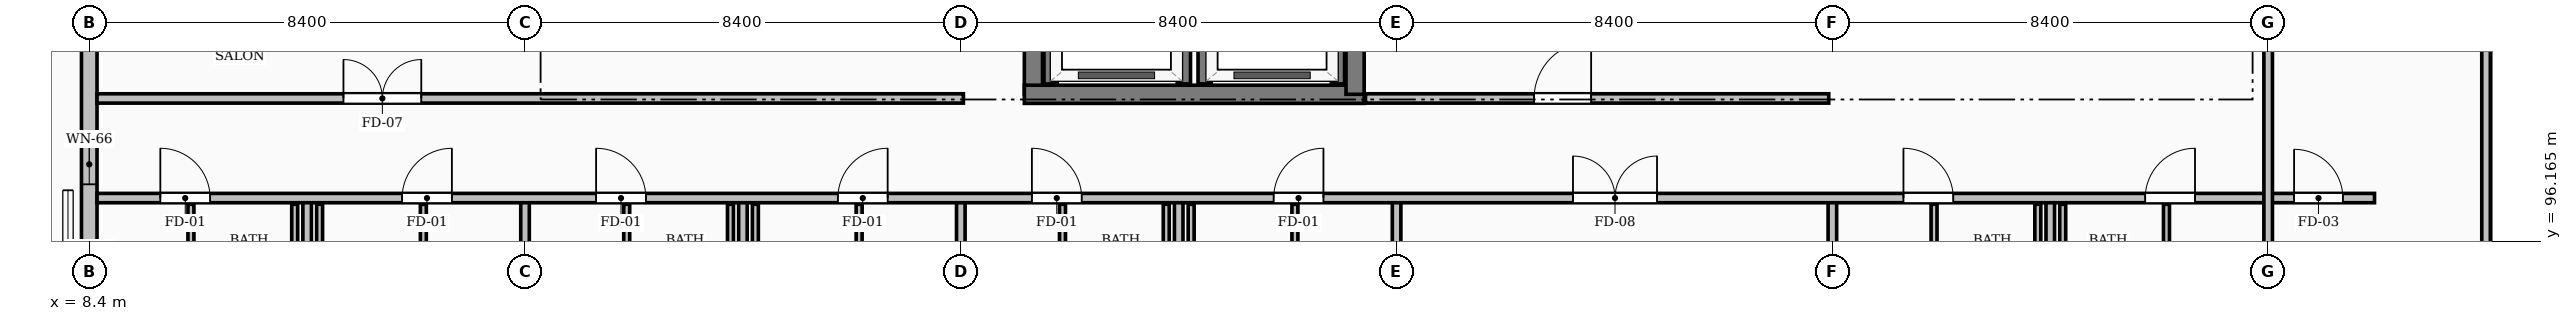
"""IFC4 building model, lengths in metres.
Left out: names, types, materials, properties, quantities, classifications, styles, units other than length and angle.
Written with IfcOpenShell. Run it as: python <this file> out.ifc"""

import sys

from ifc_helpers import new_model, si_unit, direction, frame, frame_2d, origin, place, context, subcontext, project, spatial, rectangle, extrude, element, fill, save


model = new_model("IFC4")
c1 = context("Model", 3, precision=1e-05, world=origin(), true_north=direction((0.0, 1.0)))
c2 = subcontext(c1, "Body", "Model", "MODEL_VIEW")
j1 = project(units=[si_unit("LENGTHUNIT", "METRE"), si_unit("PLANEANGLEUNIT", "RADIAN")], contexts=[c1])
p1 = place(None, origin())
s1 = spatial("IfcSite", under=j1, at=p1, CompositionType="ELEMENT")
p2 = place(p1, origin())
s2 = spatial("IfcBuilding", under=s1, at=p2, CompositionType="ELEMENT")
p3 = place(p2, frame((0.0, 0.0, 28.56)))
s3 = spatial("IfcBuildingStorey", under=s2, at=p3, CompositionType="ELEMENT", Elevation=28.56)
p4 = place(p3, frame((26.6, 99.0, 0.0), z_axis=(0.0, 0.0, 1.0), x_axis=(0.0, 1.0, 0.0)))
e1 = element("IfcWall", 1, at=p4, inside=s3, PredefinedType="SHEAR", context=c2, shape_type="SweptSolid", body=[
    extrude(rectangle(XDim=6.15, YDim=0.35, at=frame_2d((3.075, 0.0))), origin(), (0.0, 0.0, 1.0), 3.12),
])
p5 = place(p3, frame((26.425, 99.0, 0.0), z_axis=(0.0, 0.0, 1.0), x_axis=(1.0, 0.0, 0.0)))
e2 = element("IfcWall", 2, at=p5, inside=s3, PredefinedType="SHEAR", context=c2, shape_type="SweptSolid", body=[
    extrude(rectangle(XDim=6.55, YDim=0.35, at=frame_2d((3.275, 0.0))), origin(), (0.0, 0.0, 1.0), 3.12),
])
p6 = place(p3, frame((32.8, 99.0, 0.0), z_axis=(0.0, 0.0, 1.0), x_axis=(0.0, 1.0, 0.0)))
e3 = element("IfcWall", 3, at=p6, inside=s3, PredefinedType="SHEAR", context=c2, shape_type="SweptSolid", body=[
    extrude(rectangle(XDim=6.15, YDim=0.35, at=frame_2d((3.075, 0.0))), origin(), (0.0, 0.0, 1.0), 3.12),
])
p7 = place(p3, frame((8.4, 92.701, 0.0), z_axis=(0.0, 0.0, 1.0), x_axis=(0.0, 1.0, 0.0)))
e4 = element("IfcWall", 4, at=p7, inside=s3, PredefinedType="SOLIDWALL", context=c2, shape_type="SweptSolid", body=[
    extrude(rectangle(XDim=7.798, YDim=0.3, at=frame_2d((3.899, 0.0))), origin(), (0.0, 0.0, 1.0), 2.494),
])
p8 = place(p7, frame((2.464, 0.0, 0.3)))
e5 = element("IfcOpeningElement", 5, at=p8, cuts=e4, PredefinedType="OPENING", context=c2, shape_type="SweptSolid", body=[
    extrude(rectangle(XDim=0.77, YDim=1.9, at=frame_2d((0.385, 0.95))), frame((0.0, 0.16, 0.0), z_axis=(0.0, -1.0, 0.0), x_axis=(1.0, 0.0, 0.0)), (0.0, 0.0, 1.0), 0.32),
])
p9 = place(p7, frame((4.564, 0.0, 0.3)))
e6 = element("IfcOpeningElement", 6, at=p9, cuts=e4, PredefinedType="OPENING", context=c2, shape_type="SweptSolid", body=[
    extrude(rectangle(XDim=0.77, YDim=1.9, at=frame_2d((0.385, 0.95))), frame((0.0, 0.16, 0.0), z_axis=(0.0, -1.0, 0.0), x_axis=(1.0, 0.0, 0.0)), (0.0, 0.0, 1.0), 0.32),
])
for number, where, z_axis, x_axis in (
    (7, (26.93, 99.2, 0.0), (0.0, 0.0, 1.0), (0.0, 1.0, 0.0)),
    (8, (29.5, 99.2, 0.0), (0.0, 0.0, 1.0), (0.0, 1.0, 0.0)),
    (9, (29.9, 99.2, 0.0), (0.0, 0.0, 1.0), (0.0, 1.0, 0.0)),
    (10, (32.47, 99.2, 0.0), (0.0, 0.0, 1.0), (0.0, 1.0, 0.0)),
):
    element("IfcWall", number, at=place(p3, frame(where, z_axis=z_axis, x_axis=x_axis)), inside=s3, PredefinedType="SOLIDWALL", context=c2, shape_type="SweptSolid", body=[
        extrude(rectangle(XDim=2.2, YDim=0.255, at=frame_2d((1.1, 0.0))), origin(), (0.0, 0.0, 1.0), 3.12),
    ])
for number, where, z_axis, x_axis in (
    (11, (10.36, 94.73, 0.0), (0.0, 0.0, 1.0), (0.0, 1.0, 0.0)),
    (12, (12.36, 94.73, 0.0), (0.0, 0.0, 1.0), (0.0, 1.0, 0.0)),
    (13, (12.84, 94.73, 0.0), (0.0, 0.0, 1.0), (0.0, 1.0, 0.0)),
    (14, (14.84, 94.73, 0.0), (0.0, 0.0, 1.0), (0.0, 1.0, 0.0)),
):
    element("IfcWall", number, at=place(p3, frame(where, z_axis=z_axis, x_axis=x_axis)), inside=s3, PredefinedType="PARTITIONING", context=c2, shape_type="SweptSolid", body=[
        extrude(rectangle(XDim=2.15, YDim=0.115, at=frame_2d((1.075, 0.0))), origin(), (0.0, 0.0, 1.0), 3.12),
    ])
p10 = place(p3, frame((12.6, 92.55, 0.0), z_axis=(0.0, 0.0, 1.0), x_axis=(0.0, 1.0, 0.0)))
e15 = element("IfcWall", 15, at=p10, inside=s3, PredefinedType="PARTITIONING", context=c2, shape_type="SweptSolid", body=[
    extrude(rectangle(XDim=4.45, YDim=0.165, at=frame_2d((2.225, 0.0))), origin(), (0.0, 0.0, 1.0), 3.12),
])
p11 = place(p3, frame((18.76, 94.73, 0.0), z_axis=(0.0, 0.0, 1.0), x_axis=(0.0, 1.0, 0.0)))
e16 = element("IfcWall", 16, at=p11, inside=s3, PredefinedType="PARTITIONING", context=c2, shape_type="SweptSolid", body=[
    extrude(rectangle(XDim=2.15, YDim=0.115, at=frame_2d((1.075, 0.0))), origin(), (0.0, 0.0, 1.0), 2.642),
])
for number, where, z_axis, x_axis in (
    (17, (20.76, 94.73, 0.0), (0.0, 0.0, 1.0), (0.0, 1.0, 0.0)),
    (18, (21.24, 94.73, 0.0), (0.0, 0.0, 1.0), (0.0, 1.0, 0.0)),
):
    element("IfcWall", number, at=place(p3, frame(where, z_axis=z_axis, x_axis=x_axis)), inside=s3, PredefinedType="PARTITIONING", context=c2, shape_type="SweptSolid", body=[
        extrude(rectangle(XDim=2.15, YDim=0.115, at=frame_2d((1.075, 0.0))), origin(), (0.0, 0.0, 1.0), 3.12),
    ])
p12 = place(p3, frame((23.24, 94.73, 0.0), z_axis=(0.0, 0.0, 1.0), x_axis=(0.0, 1.0, 0.0)))
e19 = element("IfcWall", 19, at=p12, inside=s3, PredefinedType="PARTITIONING", context=c2, shape_type="SweptSolid", body=[
    extrude(rectangle(XDim=2.15, YDim=0.115, at=frame_2d((1.075, 0.0))), origin(), (0.0, 0.0, 1.0), 2.642),
])
p13 = place(p3, frame((21.0, 92.562, 0.0), z_axis=(0.0, 0.0, 1.0), x_axis=(0.0, 1.0, 0.0)))
e20 = element("IfcWall", 20, at=p13, inside=s3, PredefinedType="PARTITIONING", context=c2, shape_type="SweptSolid", body=[
    extrude(rectangle(XDim=4.438, YDim=0.165, at=frame_2d((2.219, 0.0))), origin(), (0.0, 0.0, 1.0), 3.12),
])
p14 = place(p3, frame((16.8, 92.75, 0.0), z_axis=(0.0, 0.0, 1.0), x_axis=(0.0, 1.0, 0.0)))
e21 = element("IfcWall", 21, at=p14, inside=s3, PredefinedType="PARTITIONING", context=c2, shape_type="SweptSolid", body=[
    extrude(rectangle(XDim=4.25, YDim=0.165, at=frame_2d((2.125, 0.0))), origin(), (0.0, 0.0, 1.0), 2.455),
])
for number, where, z_axis, x_axis in (
    (22, (27.16, 94.73, 0.0), (0.0, 0.0, 1.0), (0.0, 1.0, 0.0)),
    (23, (29.16, 94.73, 0.0), (0.0, 0.0, 1.0), (0.0, 1.0, 0.0)),
    (24, (29.64, 94.73, 0.0), (0.0, 0.0, 1.0), (0.0, 1.0, 0.0)),
    (25, (31.64, 94.73, 0.0), (0.0, 0.0, 1.0), (0.0, 1.0, 0.0)),
):
    element("IfcWall", number, at=place(p3, frame(where, z_axis=z_axis, x_axis=x_axis)), inside=s3, PredefinedType="PARTITIONING", context=c2, shape_type="SweptSolid", body=[
        extrude(rectangle(XDim=2.15, YDim=0.115, at=frame_2d((1.075, 0.0))), origin(), (0.0, 0.0, 1.0), 3.12),
    ])
p15 = place(p3, frame((29.4, 92.575, 0.0), z_axis=(0.0, 0.0, 1.0), x_axis=(0.0, 1.0, 0.0)))
e26 = element("IfcWall", 26, at=p15, inside=s3, PredefinedType="PARTITIONING", context=c2, shape_type="SweptSolid", body=[
    extrude(rectangle(XDim=4.425, YDim=0.165, at=frame_2d((2.212, 0.0))), origin(), (0.0, 0.0, 1.0), 3.12),
])
for number, where, z_axis, x_axis in (
    (27, (25.2, 92.75, 0.0), (0.0, 0.0, 1.0), (0.0, 1.0, 0.0)),
    (28, (33.6, 92.75, 0.0), (0.0, 0.0, 1.0), (0.0, 1.0, 0.0)),
):
    element("IfcWall", number, at=place(p3, frame(where, z_axis=z_axis, x_axis=x_axis)), inside=s3, PredefinedType="PARTITIONING", context=c2, shape_type="SweptSolid", body=[
        extrude(rectangle(XDim=4.25, YDim=0.165, at=frame_2d((2.125, 0.0))), origin(), (0.0, 0.0, 1.0), 2.455),
    ])
for number, where, z_axis, x_axis in (
    (29, (43.96, 94.73, 0.0), (0.0, 0.0, 1.0), (0.0, 1.0, 0.0)),
    (30, (45.96, 94.73, 0.0), (0.0, 0.0, 1.0), (0.0, 1.0, 0.0)),
    (31, (46.44, 94.73, 0.0), (0.0, 0.0, 1.0), (0.0, 1.0, 0.0)),
    (32, (48.44, 94.73, 0.0), (0.0, 0.0, 1.0), (0.0, 1.0, 0.0)),
):
    element("IfcWall", number, at=place(p3, frame(where, z_axis=z_axis, x_axis=x_axis)), inside=s3, PredefinedType="PARTITIONING", context=c2, shape_type="SweptSolid", body=[
        extrude(rectangle(XDim=2.15, YDim=0.115, at=frame_2d((1.075, 0.0))), origin(), (0.0, 0.0, 1.0), 3.12),
    ])
p16 = place(p3, frame((46.2, 92.613, 0.0), z_axis=(0.0, 0.0, 1.0), x_axis=(0.0, 1.0, 0.0)))
e33 = element("IfcWall", 33, at=p16, inside=s3, PredefinedType="PARTITIONING", context=c2, shape_type="SweptSolid", body=[
    extrude(rectangle(XDim=4.387, YDim=0.165, at=frame_2d((2.194, 0.0))), origin(), (0.0, 0.0, 1.0), 3.12),
])
p17 = place(p3, frame((42.0, 92.75, 0.0), z_axis=(0.0, 0.0, 1.0), x_axis=(0.0, 1.0, 0.0)))
e34 = element("IfcWall", 34, at=p17, inside=s3, PredefinedType="PARTITIONING", context=c2, shape_type="SweptSolid", body=[
    extrude(rectangle(XDim=4.25, YDim=0.165, at=frame_2d((2.125, 0.0))), origin(), (0.0, 0.0, 1.0), 2.455),
])
p18 = place(p3, frame((8.55, 97.0, 0.0), z_axis=(0.0, 0.0, 1.0), x_axis=(1.0, 0.0, 0.0)))
e35 = element("IfcWall", 35, at=p18, inside=s3, PredefinedType="PARTITIONING", context=c2, shape_type="SweptSolid", body=[
    extrude(rectangle(XDim=41.85, YDim=0.18, at=frame_2d((20.925, 0.0))), origin(), (0.0, 0.0, 1.0), 3.12),
])
p19 = place(p18, frame((1.22, 0.0, 0.0)))
e36 = element("IfcOpeningElement", 36, at=p19, cuts=e35, PredefinedType="OPENING", context=c2, shape_type="SweptSolid", body=[
    extrude(rectangle(XDim=0.96, YDim=2.15, at=frame_2d((0.48, 1.075))), frame((0.0, 0.1, 0.0), z_axis=(0.0, -1.0, 0.0), x_axis=(1.0, 0.0, 0.0)), (0.0, 0.0, 1.0), 0.2),
])
p20 = place(p18, frame((5.88, 0.0, 0.0)))
e37 = element("IfcOpeningElement", 37, at=p20, cuts=e35, PredefinedType="OPENING", context=c2, shape_type="SweptSolid", body=[
    extrude(rectangle(XDim=0.96, YDim=2.15, at=frame_2d((0.48, 1.075))), frame((0.0, 0.1, 0.0), z_axis=(0.0, -1.0, 0.0), x_axis=(1.0, 0.0, 0.0)), (0.0, 0.0, 1.0), 0.2),
])
p21 = place(p18, frame((9.62, 0.0, 0.0)))
e38 = element("IfcOpeningElement", 38, at=p21, cuts=e35, PredefinedType="OPENING", context=c2, shape_type="SweptSolid", body=[
    extrude(rectangle(XDim=0.96, YDim=2.15, at=frame_2d((0.48, 1.075))), frame((0.0, 0.1, 0.0), z_axis=(0.0, -1.0, 0.0), x_axis=(1.0, 0.0, 0.0)), (0.0, 0.0, 1.0), 0.2),
])
p22 = place(p18, frame((14.28, 0.0, 0.0)))
e39 = element("IfcOpeningElement", 39, at=p22, cuts=e35, PredefinedType="OPENING", context=c2, shape_type="SweptSolid", body=[
    extrude(rectangle(XDim=0.96, YDim=2.15, at=frame_2d((0.48, 1.075))), frame((0.0, 0.1, 0.0), z_axis=(0.0, -1.0, 0.0), x_axis=(1.0, 0.0, 0.0)), (0.0, 0.0, 1.0), 0.2),
])
p23 = place(p18, frame((18.02, 0.0, 0.0)))
e40 = element("IfcOpeningElement", 40, at=p23, cuts=e35, PredefinedType="OPENING", context=c2, shape_type="SweptSolid", body=[
    extrude(rectangle(XDim=0.96, YDim=2.15, at=frame_2d((0.48, 1.075))), frame((0.0, 0.1, 0.0), z_axis=(0.0, -1.0, 0.0), x_axis=(1.0, 0.0, 0.0)), (0.0, 0.0, 1.0), 0.2),
])
p24 = place(p18, frame((22.68, 0.0, 0.0)))
e41 = element("IfcOpeningElement", 41, at=p24, cuts=e35, PredefinedType="OPENING", context=c2, shape_type="SweptSolid", body=[
    extrude(rectangle(XDim=0.96, YDim=2.15, at=frame_2d((0.48, 1.075))), frame((0.0, 0.1, 0.0), z_axis=(0.0, -1.0, 0.0), x_axis=(1.0, 0.0, 0.0)), (0.0, 0.0, 1.0), 0.2),
])
p25 = place(p18, frame((28.45, 0.0, 0.0)))
e42 = element("IfcOpeningElement", 42, at=p25, cuts=e35, PredefinedType="OPENING", context=c2, shape_type="SweptSolid", body=[
    extrude(rectangle(XDim=1.62, YDim=2.2, at=frame_2d((0.81, 1.1))), frame((0.0, 0.1, 0.0), z_axis=(0.0, -1.0, 0.0), x_axis=(1.0, 0.0, 0.0)), (0.0, 0.0, 1.0), 0.2),
])
p26 = place(p18, frame((34.82, 0.0, 0.0)))
e43 = element("IfcOpeningElement", 43, at=p26, cuts=e35, PredefinedType="OPENING", context=c2, shape_type="SweptSolid", body=[
    extrude(rectangle(XDim=0.96, YDim=2.15, at=frame_2d((0.48, 1.075))), frame((0.0, 0.1, 0.0), z_axis=(0.0, -1.0, 0.0), x_axis=(1.0, 0.0, 0.0)), (0.0, 0.0, 1.0), 0.2),
])
p27 = place(p18, frame((39.48, 0.0, 0.0)))
e44 = element("IfcOpeningElement", 44, at=p27, cuts=e35, PredefinedType="OPENING", context=c2, shape_type="SweptSolid", body=[
    extrude(rectangle(XDim=0.96, YDim=2.15, at=frame_2d((0.48, 1.075))), frame((0.0, 0.1, 0.0), z_axis=(0.0, -1.0, 0.0), x_axis=(1.0, 0.0, 0.0)), (0.0, 0.0, 1.0), 0.2),
])
p28 = place(p3, frame((8.55, 98.92, 0.0), z_axis=(0.0, 0.0, 1.0), x_axis=(1.0, 0.0, 0.0)))
e45 = element("IfcWall", 45, at=p28, inside=s3, PredefinedType="PARTITIONING", context=c2, shape_type="SweptSolid", body=[
    extrude(rectangle(XDim=16.7, YDim=0.18, at=frame_2d((8.35, 0.0))), origin(), (0.0, 0.0, 1.0), 3.12),
])
p29 = place(p28, frame((4.75, 0.0, 0.0)))
e46 = element("IfcOpeningElement", 46, at=p29, cuts=e45, PredefinedType="OPENING", context=c2, shape_type="SweptSolid", body=[
    extrude(rectangle(XDim=1.5, YDim=2.2, at=frame_2d((0.75, 1.1))), frame((0.0, 0.1, 0.0), z_axis=(0.0, -1.0, 0.0), x_axis=(1.0, 0.0, 0.0)), (0.0, 0.0, 1.0), 0.2),
])
p30 = place(p3, frame((33.0, 98.92, 0.0), z_axis=(0.0, 0.0, 1.0), x_axis=(1.0, 0.0, 0.0)))
e47 = element("IfcWall", 47, at=p30, inside=s3, PredefinedType="PARTITIONING", context=c2, shape_type="SweptSolid", body=[
    extrude(rectangle(XDim=8.93, YDim=0.18, at=frame_2d((4.465, 0.0))), origin(), (0.0, 0.0, 1.0), 3.12),
])
p31 = place(p30, frame((3.25, 0.0, 0.0)))
e48 = element("IfcOpeningElement", 48, at=p31, cuts=e47, PredefinedType="OPENING", context=c2, shape_type="SweptSolid", body=[
    extrude(rectangle(XDim=1.1, YDim=2.1, at=frame_2d((0.55, 1.05))), frame((0.0, 0.1, 0.0), z_axis=(0.0, -1.0, 0.0), x_axis=(1.0, 0.0, 0.0)), (0.0, 0.0, 1.0), 0.2),
])
p32 = place(p3, frame((50.4, 97.0, 0.0), z_axis=(0.0, 0.0, 1.0), x_axis=(1.0, 0.0, 0.0)))
e49 = element("IfcWall", 49, at=p32, inside=s3, PredefinedType="PARTITIONING", context=c2, shape_type="SweptSolid", body=[
    extrude(rectangle(XDim=2.05, YDim=0.18, at=frame_2d((1.025, 0.0))), origin(), (0.0, 0.0, 1.0), 3.12),
])
p33 = place(p32, frame((0.5, 0.0, 0.0)))
e50 = element("IfcOpeningElement", 50, at=p33, cuts=e49, PredefinedType="OPENING", context=c2, shape_type="SweptSolid", body=[
    extrude(rectangle(XDim=0.94, YDim=2.1, at=frame_2d((0.47, 1.05))), frame((0.0, 0.1, 0.0), z_axis=(0.0, -1.0, 0.0), x_axis=(1.0, 0.0, 0.0)), (0.0, 0.0, 1.0), 0.2),
])
p34 = place(p3, frame((54.6, 92.625, 0.0), z_axis=(0.0, 0.0, 1.0), x_axis=(0.0, 1.0, 0.0)))
e51 = element("IfcWall", 51, at=p34, inside=s3, PredefinedType="PARTITIONING", context=c2, shape_type="SweptSolid", body=[
    extrude(rectangle(XDim=12.475, YDim=0.165, at=frame_2d((6.238, 0.0))), origin(), (0.0, 0.0, 1.0), 3.12),
])
p35 = place(p3, frame((50.4, 92.75, 0.0), z_axis=(0.0, 0.0, 1.0), x_axis=(0.0, 1.0, 0.0)))
e52 = element("IfcWall", 52, at=p35, inside=s3, PredefinedType="PARTITIONING", context=c2, shape_type="SweptSolid", body=[
    extrude(rectangle(XDim=12.35, YDim=0.165, at=frame_2d((6.175, 0.0))), origin(), (0.0, 0.0, 1.0), 2.455),
])
p36 = place(p9, origin())
e53 = element("IfcWindow", 53, at=p36, inside=s3, PartitioningType="SINGLE_PANEL", PredefinedType="WINDOW", context=c2, shape_type="SweptSolid", body=[
    extrude(rectangle(XDim=0.77, YDim=1.9, at=frame_2d((0.385, 0.95))), frame((0.0, 0.03, 0.0), z_axis=(0.0, -1.0, 0.0), x_axis=(1.0, 0.0, 0.0)), (0.0, 0.0, 1.0), 0.06),
])
fill(e6, e53)
p37 = place(p19, origin())
e54 = element("IfcDoor", 54, at=p37, inside=s3, OperationType="SINGLE_SWING_LEFT", PredefinedType="DOOR", context=c2, shape_type="SweptSolid", body=[
    extrude(rectangle(XDim=0.96, YDim=2.15, at=frame_2d((0.48, 1.075))), frame((0.0, 0.025, 0.0), z_axis=(0.0, -1.0, 0.0), x_axis=(1.0, 0.0, 0.0)), (0.0, 0.0, 1.0), 0.05),
])
fill(e36, e54)
p38 = place(p20, origin())
e55 = element("IfcDoor", 55, at=p38, inside=s3, OperationType="SINGLE_SWING_RIGHT", PredefinedType="DOOR", context=c2, shape_type="SweptSolid", body=[
    extrude(rectangle(XDim=0.96, YDim=2.15, at=frame_2d((0.48, 1.075))), frame((0.0, 0.025, 0.0), z_axis=(0.0, -1.0, 0.0), x_axis=(1.0, 0.0, 0.0)), (0.0, 0.0, 1.0), 0.05),
])
fill(e37, e55)
p39 = place(p21, origin())
e56 = element("IfcDoor", 56, at=p39, inside=s3, OperationType="SINGLE_SWING_LEFT", PredefinedType="DOOR", context=c2, shape_type="SweptSolid", body=[
    extrude(rectangle(XDim=0.96, YDim=2.15, at=frame_2d((0.48, 1.075))), frame((0.0, 0.025, 0.0), z_axis=(0.0, -1.0, 0.0), x_axis=(1.0, 0.0, 0.0)), (0.0, 0.0, 1.0), 0.05),
])
fill(e38, e56)
p40 = place(p22, origin())
e57 = element("IfcDoor", 57, at=p40, inside=s3, OperationType="SINGLE_SWING_RIGHT", PredefinedType="DOOR", context=c2, shape_type="SweptSolid", body=[
    extrude(rectangle(XDim=0.96, YDim=2.15, at=frame_2d((0.48, 1.075))), frame((0.0, 0.025, 0.0), z_axis=(0.0, -1.0, 0.0), x_axis=(1.0, 0.0, 0.0)), (0.0, 0.0, 1.0), 0.05),
])
fill(e39, e57)
p41 = place(p23, origin())
e58 = element("IfcDoor", 58, at=p41, inside=s3, OperationType="SINGLE_SWING_LEFT", PredefinedType="DOOR", context=c2, shape_type="SweptSolid", body=[
    extrude(rectangle(XDim=0.96, YDim=2.15, at=frame_2d((0.48, 1.075))), frame((0.0, 0.025, 0.0), z_axis=(0.0, -1.0, 0.0), x_axis=(1.0, 0.0, 0.0)), (0.0, 0.0, 1.0), 0.05),
])
fill(e40, e58)
p42 = place(p24, origin())
e59 = element("IfcDoor", 59, at=p42, inside=s3, OperationType="SINGLE_SWING_RIGHT", PredefinedType="DOOR", context=c2, shape_type="SweptSolid", body=[
    extrude(rectangle(XDim=0.96, YDim=2.15, at=frame_2d((0.48, 1.075))), frame((0.0, 0.025, 0.0), z_axis=(0.0, -1.0, 0.0), x_axis=(1.0, 0.0, 0.0)), (0.0, 0.0, 1.0), 0.05),
])
fill(e41, e59)
p43 = place(p25, origin())
e60 = element("IfcDoor", 60, at=p43, inside=s3, OperationType="DOUBLE_DOOR_SINGLE_SWING", PredefinedType="DOOR", context=c2, shape_type="SweptSolid", body=[
    extrude(rectangle(XDim=1.62, YDim=2.2, at=frame_2d((0.81, 1.1))), frame((0.0, 0.025, 0.0), z_axis=(0.0, -1.0, 0.0), x_axis=(1.0, 0.0, 0.0)), (0.0, 0.0, 1.0), 0.05),
])
fill(e42, e60)
p44 = place(p26, origin())
e61 = element("IfcDoor", 61, at=p44, inside=s3, OperationType="SINGLE_SWING_LEFT", PredefinedType="DOOR", context=c2, shape_type="SweptSolid", body=[
    extrude(rectangle(XDim=0.96, YDim=2.15, at=frame_2d((0.48, 1.075))), frame((0.0, 0.025, 0.0), z_axis=(0.0, -1.0, 0.0), x_axis=(1.0, 0.0, 0.0)), (0.0, 0.0, 1.0), 0.05),
])
fill(e43, e61)
p45 = place(p27, origin())
e62 = element("IfcDoor", 62, at=p45, inside=s3, OperationType="SINGLE_SWING_RIGHT", PredefinedType="DOOR", context=c2, shape_type="SweptSolid", body=[
    extrude(rectangle(XDim=0.96, YDim=2.15, at=frame_2d((0.48, 1.075))), frame((0.0, 0.025, 0.0), z_axis=(0.0, -1.0, 0.0), x_axis=(1.0, 0.0, 0.0)), (0.0, 0.0, 1.0), 0.05),
])
fill(e44, e62)
p46 = place(p29, origin())
e63 = element("IfcDoor", 63, at=p46, inside=s3, OperationType="DOUBLE_DOOR_SINGLE_SWING", PredefinedType="DOOR", context=c2, shape_type="SweptSolid", body=[
    extrude(rectangle(XDim=1.5, YDim=2.2, at=frame_2d((0.75, 1.1))), frame((0.0, 0.025, 0.0), z_axis=(0.0, -1.0, 0.0), x_axis=(1.0, 0.0, 0.0)), (0.0, 0.0, 1.0), 0.05),
])
fill(e46, e63)
p47 = place(p31, origin())
e64 = element("IfcDoor", 64, at=p47, inside=s3, OperationType="SINGLE_SWING_RIGHT", PredefinedType="DOOR", context=c2, shape_type="SweptSolid", body=[
    extrude(rectangle(XDim=1.1, YDim=2.1, at=frame_2d((0.55, 1.05))), frame((0.0, 0.025, 0.0), z_axis=(0.0, -1.0, 0.0), x_axis=(1.0, 0.0, 0.0)), (0.0, 0.0, 1.0), 0.05),
])
fill(e48, e64)
p48 = place(p33, origin())
e65 = element("IfcDoor", 65, at=p48, inside=s3, OperationType="SINGLE_SWING_LEFT", PredefinedType="DOOR", context=c2, shape_type="SweptSolid", body=[
    extrude(rectangle(XDim=0.94, YDim=2.1, at=frame_2d((0.47, 1.05))), frame((0.0, 0.025, 0.0), z_axis=(0.0, -1.0, 0.0), x_axis=(1.0, 0.0, 0.0)), (0.0, 0.0, 1.0), 0.05),
])
fill(e50, e65)
save(model, sys.argv[1])
